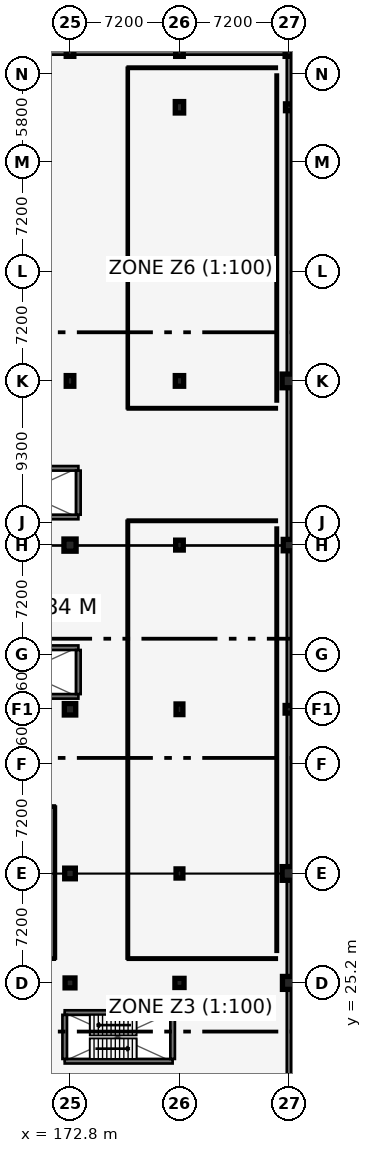
"""IFC4 building model, lengths in metres.
Left out: names, types, materials, properties, quantities, classifications, styles, units other than length and angle.
Written with IfcOpenShell. Run it as: python <this file> out.ifc"""

import sys

from ifc_helpers import new_model, si_unit, direction, frame, frame_2d, origin, origin_2d, place, context, subcontext, project, spatial, rectangle, circle, extrude, element, fill, save


model = new_model("IFC4")
c1 = context("Model", 3, precision=1e-05, world=origin(), true_north=direction((0.0, 1.0)))
c2 = subcontext(c1, "Body", "Model", "MODEL_VIEW")
j1 = project(units=[si_unit("LENGTHUNIT", "METRE"), si_unit("PLANEANGLEUNIT", "RADIAN")], contexts=[c1])
p1 = place(None, origin())
s1 = spatial("IfcSite", under=j1, at=p1, CompositionType="ELEMENT")
p2 = place(p1, origin())
s2 = spatial("IfcBuilding", under=s1, at=p2, CompositionType="ELEMENT")
p3 = place(p2, frame((0.0, 0.0, 9.0)))
s3 = spatial("IfcBuildingStorey", under=s2, at=p3, CompositionType="ELEMENT", Elevation=9.0)
p4 = place(p3, frame((172.8, 25.2, 0.0), z_axis=(0.0, 0.0, 1.0), x_axis=(1.0, 0.0, 0.0)))
e1 = element("IfcColumn", 1, at=p4, inside=s3, PredefinedType="COLUMN", context=c2, shape_type="SweptSolid", body=[
    extrude(rectangle(XDim=0.65, YDim=0.65, at=origin_2d()), origin(), (0.0, 0.0, 1.0), 4.2),
])
p5 = place(p3, frame((172.8, 32.4, 0.0), z_axis=(0.0, 0.0, 1.0), x_axis=(1.0, 0.0, 0.0)))
e2 = element("IfcColumn", 2, at=p5, inside=s3, PredefinedType="COLUMN", context=c2, shape_type="SweptSolid", body=[
    extrude(rectangle(XDim=0.7, YDim=0.7, at=origin_2d()), origin(), (0.0, 0.0, 1.0), 4.2),
])
p6 = place(p3, frame((172.8, 43.2, 0.0), z_axis=(0.0, 0.0, 1.0), x_axis=(1.0, 0.0, 0.0)))
e3 = element("IfcColumn", 3, at=p6, inside=s3, PredefinedType="COLUMN", context=c2, shape_type="SweptSolid", body=[
    extrude(rectangle(XDim=0.75, YDim=0.75, at=origin_2d()), origin(), (0.0, 0.0, 1.0), 4.2),
])
p7 = place(p3, frame((172.8, 54.0, 0.0), z_axis=(0.0, 0.0, 1.0), x_axis=(1.0, 0.0, 0.0)))
e4 = element("IfcColumn", 4, at=p7, inside=s3, PredefinedType="COLUMN", context=c2, shape_type="SweptSolid", body=[
    extrude(rectangle(XDim=0.8, YDim=0.8, at=origin_2d()), origin(), (0.0, 0.0, 1.0), 4.2),
])
p8 = place(p3, frame((172.8, 64.8, 0.0), z_axis=(0.0, 0.0, 1.0), x_axis=(1.0, 0.0, 0.0)))
e5 = element("IfcColumn", 5, at=p8, inside=s3, PredefinedType="COLUMN", context=c2, shape_type="SweptSolid", body=[
    extrude(rectangle(XDim=0.5, YDim=0.7, at=origin_2d()), origin(), (0.0, 0.0, 1.0), 4.2),
])
p9 = place(p3, frame((172.8, 86.4, 0.0), z_axis=(0.0, 0.0, 1.0), x_axis=(1.0, 0.0, 0.0)))
e6 = element("IfcColumn", 6, at=p9, inside=s3, PredefinedType="COLUMN", context=c2, shape_type="SweptSolid", body=[
    extrude(rectangle(XDim=0.5, YDim=0.5, at=origin_2d()), origin(), (0.0, 0.0, 1.0), 4.2),
])
p10 = place(p3, frame((180.0, 25.2, 0.0), z_axis=(0.0, 0.0, 1.0), x_axis=(1.0, 0.0, 0.0)))
e7 = element("IfcColumn", 7, at=p10, inside=s3, PredefinedType="COLUMN", context=c2, shape_type="SweptSolid", body=[
    extrude(circle(Radius=0.3, at=origin_2d()), origin(), (0.0, 0.0, 1.0), 4.2),
])
p11 = place(p3, frame((180.0, 32.4, 0.0), z_axis=(0.0, 0.0, 1.0), x_axis=(1.0, 0.0, 0.0)))
e8 = element("IfcColumn", 8, at=p11, inside=s3, PredefinedType="COLUMN", context=c2, shape_type="SweptSolid", body=[
    extrude(rectangle(XDim=0.45, YDim=0.6, at=origin_2d()), origin(), (0.0, 0.0, 1.0), 4.2),
])
p12 = place(p3, frame((180.0, 43.2, 0.0), z_axis=(0.0, 0.0, 1.0), x_axis=(1.0, 0.0, 0.0)))
e9 = element("IfcColumn", 9, at=p12, inside=s3, PredefinedType="COLUMN", context=c2, shape_type="SweptSolid", body=[
    extrude(rectangle(XDim=0.45, YDim=0.7, at=origin_2d()), origin(), (0.0, 0.0, 1.0), 4.2),
])
p13 = place(p3, frame((180.0, 54.0, 0.0), z_axis=(0.0, 0.0, 1.0), x_axis=(1.0, 0.0, 0.0)))
e10 = element("IfcColumn", 10, at=p13, inside=s3, PredefinedType="COLUMN", context=c2, shape_type="SweptSolid", body=[
    extrude(rectangle(XDim=0.5, YDim=0.65, at=origin_2d()), origin(), (0.0, 0.0, 1.0), 4.2),
])
p14 = place(p3, frame((180.0, 64.8, 0.0), z_axis=(0.0, 0.0, 1.0), x_axis=(1.0, 0.0, 0.0)))
e11 = element("IfcColumn", 11, at=p14, inside=s3, PredefinedType="COLUMN", context=c2, shape_type="SweptSolid", body=[
    extrude(rectangle(XDim=0.55, YDim=0.7, at=origin_2d()), origin(), (0.0, 0.0, 1.0), 4.2),
])
p15 = place(p3, frame((180.0, 82.8, 0.0), z_axis=(0.0, 0.0, 1.0), x_axis=(1.0, 0.0, 0.0)))
e12 = element("IfcColumn", 12, at=p15, inside=s3, PredefinedType="COLUMN", context=c2, shape_type="SweptSolid", body=[
    extrude(rectangle(XDim=0.55, YDim=0.75, at=origin_2d()), origin(), (0.0, 0.0, 1.0), 4.2),
])
p16 = place(p3, frame((180.0, 86.4, 0.0), z_axis=(0.0, 0.0, 1.0), x_axis=(1.0, 0.0, 0.0)))
e13 = element("IfcColumn", 13, at=p16, inside=s3, PredefinedType="COLUMN", context=c2, shape_type="SweptSolid", body=[
    extrude(rectangle(XDim=0.5, YDim=0.5, at=origin_2d()), origin(), (0.0, 0.0, 1.0), 4.2),
])
p17 = place(p3, frame((187.2, 25.2, 0.0), z_axis=(0.0, 0.0, 1.0), x_axis=(1.0, 0.0, 0.0)))
e14 = element("IfcColumn", 14, at=p17, inside=s3, PredefinedType="COLUMN", context=c2, shape_type="SweptSolid", body=[
    extrude(rectangle(XDim=0.85, YDim=0.85, at=origin_2d()), origin(), (0.0, 0.0, 1.0), 4.2),
])
p18 = place(p3, frame((187.2, 32.4, 0.0), z_axis=(0.0, 0.0, 1.0), x_axis=(1.0, 0.0, 0.0)))
e15 = element("IfcColumn", 15, at=p18, inside=s3, PredefinedType="COLUMN", context=c2, shape_type="SweptSolid", body=[
    extrude(rectangle(XDim=0.9, YDim=0.9, at=origin_2d()), origin(), (0.0, 0.0, 1.0), 4.2),
])
p19 = place(p3, frame((187.2, 43.2, 0.0), z_axis=(0.0, 0.0, 1.0), x_axis=(1.0, 0.0, 0.0)))
e16 = element("IfcColumn", 16, at=p19, inside=s3, PredefinedType="COLUMN", context=c2, shape_type="SweptSolid", body=[
    extrude(circle(Radius=0.25, at=origin_2d()), origin(), (0.0, 0.0, 1.0), 4.2),
])
p20 = place(p3, frame((187.2, 54.0, 0.0), z_axis=(0.0, 0.0, 1.0), x_axis=(1.0, 0.0, 0.0)))
e17 = element("IfcColumn", 17, at=p20, inside=s3, PredefinedType="COLUMN", context=c2, shape_type="SweptSolid", body=[
    extrude(circle(Radius=0.375, at=origin_2d()), origin(), (0.0, 0.0, 1.0), 4.2),
])
p21 = place(p3, frame((187.2, 64.8, 0.0), z_axis=(0.0, 0.0, 1.0), x_axis=(1.0, 0.0, 0.0)))
e18 = element("IfcColumn", 18, at=p21, inside=s3, PredefinedType="COLUMN", context=c2, shape_type="SweptSolid", body=[
    extrude(circle(Radius=0.45, at=origin_2d()), origin(), (0.0, 0.0, 1.0), 4.2),
])
p22 = place(p3, frame((187.2, 82.8, 0.0), z_axis=(0.0, 0.0, 1.0), x_axis=(1.0, 0.0, 0.0)))
e19 = element("IfcColumn", 19, at=p22, inside=s3, PredefinedType="COLUMN", context=c2, shape_type="SweptSolid", body=[
    extrude(rectangle(XDim=0.45, YDim=0.45, at=origin_2d()), origin(), (0.0, 0.0, 1.0), 4.2),
])
p23 = place(p3, frame((187.2, 86.4, 0.0), z_axis=(0.0, 0.0, 1.0), x_axis=(1.0, 0.0, 0.0)))
e20 = element("IfcColumn", 20, at=p23, inside=s3, PredefinedType="COLUMN", context=c2, shape_type="SweptSolid", body=[
    extrude(rectangle(XDim=0.5, YDim=0.5, at=origin_2d()), origin(), (0.0, 0.0, 1.0), 4.2),
])
p24 = place(p3, frame((187.2, 0.0, 0.0), z_axis=(0.0, 0.0, 1.0), x_axis=(0.0, 1.0, 0.0)))
e21 = element("IfcWall", 21, at=p24, inside=s3, PredefinedType="SOLIDWALL", context=c2, shape_type="SweptSolid", body=[
    extrude(rectangle(XDim=86.4, YDim=0.28, at=frame_2d((43.2, 0.0))), origin(), (0.0, 0.0, 1.0), 3.4),
])
p25 = place(p24, frame((38.2, 0.0, 0.78)))
e22 = element("IfcOpeningElement", 22, at=p25, cuts=e21, PredefinedType="OPENING", context=c2, shape_type="SweptSolid", body=[
    extrude(rectangle(XDim=1.25, YDim=1.7, at=frame_2d((0.625, 0.85))), frame((0.0, 0.15, 0.0), z_axis=(0.0, -1.0, 0.0), x_axis=(1.0, 0.0, 0.0)), (0.0, 0.0, 1.0), 0.3),
])
p26 = place(p24, frame((45.4, 0.0, 0.78)))
e23 = element("IfcOpeningElement", 23, at=p26, cuts=e21, PredefinedType="OPENING", context=c2, shape_type="SweptSolid", body=[
    extrude(rectangle(XDim=1.35, YDim=1.75, at=frame_2d((0.675, 0.875))), frame((0.0, 0.15, 0.0), z_axis=(0.0, -1.0, 0.0), x_axis=(1.0, 0.0, 0.0)), (0.0, 0.0, 1.0), 0.3),
])
p27 = place(p24, frame((59.8, 0.0, 0.78)))
e24 = element("IfcOpeningElement", 24, at=p27, cuts=e21, PredefinedType="OPENING", context=c2, shape_type="SweptSolid", body=[
    extrude(rectangle(XDim=1.65, YDim=1.8, at=frame_2d((0.825, 0.9))), frame((0.0, 0.15, 0.0), z_axis=(0.0, -1.0, 0.0), x_axis=(1.0, 0.0, 0.0)), (0.0, 0.0, 1.0), 0.3),
])
p28 = place(p24, frame((67.0, 0.0, 0.78)))
e25 = element("IfcOpeningElement", 25, at=p28, cuts=e21, PredefinedType="OPENING", context=c2, shape_type="SweptSolid", body=[
    extrude(rectangle(XDim=1.95, YDim=1.8, at=frame_2d((0.975, 0.9))), frame((0.0, 0.15, 0.0), z_axis=(0.0, -1.0, 0.0), x_axis=(1.0, 0.0, 0.0)), (0.0, 0.0, 1.0), 0.3),
])
p29 = place(p24, frame((74.2, 0.0, 0.78)))
e26 = element("IfcOpeningElement", 26, at=p29, cuts=e21, PredefinedType="OPENING", context=c2, shape_type="SweptSolid", body=[
    extrude(rectangle(XDim=2.1, YDim=1.8, at=frame_2d((1.05, 0.9))), frame((0.0, 0.15, 0.0), z_axis=(0.0, -1.0, 0.0), x_axis=(1.0, 0.0, 0.0)), (0.0, 0.0, 1.0), 0.3),
])
p30 = place(p3, frame((187.2, 86.4, 0.0), z_axis=(0.0, 0.0, 1.0), x_axis=(-1.0, 0.0, 0.0)))
e27 = element("IfcWall", 27, at=p30, inside=s3, PredefinedType="SOLIDWALL", context=c2, shape_type="SweptSolid", body=[
    extrude(rectangle(XDim=21.6, YDim=0.28, at=frame_2d((10.8, 0.0))), origin(), (0.0, 0.0, 1.0), 3.4),
])
p31 = place(p30, frame((2.2, 0.0, 0.78)))
e28 = element("IfcOpeningElement", 28, at=p31, cuts=e27, PredefinedType="OPENING", context=c2, shape_type="SweptSolid", body=[
    extrude(rectangle(XDim=1.65, YDim=1.8, at=frame_2d((0.825, 0.9))), frame((0.0, 0.15, 0.0), z_axis=(0.0, -1.0, 0.0), x_axis=(1.0, 0.0, 0.0)), (0.0, 0.0, 1.0), 0.3),
])
p32 = place(p30, frame((9.4, 0.0, 0.78)))
e29 = element("IfcOpeningElement", 29, at=p32, cuts=e27, PredefinedType="OPENING", context=c2, shape_type="SweptSolid", body=[
    extrude(rectangle(XDim=1.95, YDim=1.8, at=frame_2d((0.975, 0.9))), frame((0.0, 0.15, 0.0), z_axis=(0.0, -1.0, 0.0), x_axis=(1.0, 0.0, 0.0)), (0.0, 0.0, 1.0), 0.3),
])
p33 = place(p3, frame((172.45, 20.05, 0.0), z_axis=(0.0, 0.0, 1.0), x_axis=(1.0, 0.0, 0.0)))
e30 = element("IfcWall", 30, at=p33, inside=s3, PredefinedType="SHEAR", context=c2, shape_type="SweptSolid", body=[
    extrude(rectangle(XDim=7.1, YDim=0.3, at=frame_2d((3.55, 0.0))), origin(), (0.0, 0.0, 1.0), 3.875),
])
p34 = place(p33, frame((0.35, 0.0, 0.0)))
e31 = element("IfcOpeningElement", 31, at=p34, cuts=e30, PredefinedType="OPENING", context=c2, shape_type="SweptSolid", body=[
    extrude(rectangle(XDim=1.05, YDim=2.15, at=frame_2d((0.525, 1.075))), frame((0.0, 0.16, 0.0), z_axis=(0.0, -1.0, 0.0), x_axis=(1.0, 0.0, 0.0)), (0.0, 0.0, 1.0), 0.32),
])
p35 = place(p3, frame((179.55, 23.25, 0.0), z_axis=(0.0, 0.0, 1.0), x_axis=(-1.0, 0.0, 0.0)))
e32 = element("IfcWall", 32, at=p35, inside=s3, PredefinedType="SHEAR", context=c2, shape_type="SweptSolid", body=[
    extrude(rectangle(XDim=7.1, YDim=0.3, at=frame_2d((3.55, 0.0))), origin(), (0.0, 0.0, 1.0), 3.875),
])
for number, where, z_axis, x_axis in (
    (33, (179.55, 20.2, 0.0), (0.0, 0.0, 1.0), (0.0, 1.0, 0.0)),
    (34, (172.45, 23.1, 0.0), (0.0, 0.0, 1.0), (0.0, -1.0, 0.0)),
):
    element("IfcWall", number, at=place(p3, frame(where, z_axis=z_axis, x_axis=x_axis)), inside=s3, PredefinedType="SHEAR", context=c2, shape_type="SweptSolid", body=[
        extrude(rectangle(XDim=2.9, YDim=0.3, at=frame_2d((1.45, 0.0))), origin(), (0.0, 0.0, 1.0), 3.875),
    ])
for number, where, z_axis, x_axis in (
    (35, (166.25, 44.05, 0.0), (0.0, 0.0, 1.0), (1.0, 0.0, 0.0)),
    (36, (173.35, 47.25, 0.0), (0.0, 0.0, 1.0), (-1.0, 0.0, 0.0)),
):
    element("IfcWall", number, at=place(p3, frame(where, z_axis=z_axis, x_axis=x_axis)), inside=s3, PredefinedType="SHEAR", context=c2, shape_type="SweptSolid", body=[
        extrude(rectangle(XDim=7.1, YDim=0.3, at=frame_2d((3.55, 0.0))), origin(), (0.0, 0.0, 1.0), 3.925),
    ])
p36 = place(p3, frame((173.35, 44.2, 0.0), z_axis=(0.0, 0.0, 1.0), x_axis=(0.0, 1.0, 0.0)))
e37 = element("IfcWall", 37, at=p36, inside=s3, PredefinedType="SHEAR", context=c2, shape_type="SweptSolid", body=[
    extrude(rectangle(XDim=2.9, YDim=0.3, at=frame_2d((1.45, 0.0))), origin(), (0.0, 0.0, 1.0), 3.925),
])
for number, where, z_axis, x_axis in (
    (38, (166.25, 55.85, 0.0), (0.0, 0.0, 1.0), (1.0, 0.0, 0.0)),
    (39, (173.35, 59.05, 0.0), (0.0, 0.0, 1.0), (-1.0, 0.0, 0.0)),
):
    element("IfcWall", number, at=place(p3, frame(where, z_axis=z_axis, x_axis=x_axis)), inside=s3, PredefinedType="SHEAR", context=c2, shape_type="SweptSolid", body=[
        extrude(rectangle(XDim=7.1, YDim=0.3, at=frame_2d((3.55, 0.0))), origin(), (0.0, 0.0, 1.0), 3.925),
    ])
p37 = place(p3, frame((173.35, 56.0, 0.0), z_axis=(0.0, 0.0, 1.0), x_axis=(0.0, 1.0, 0.0)))
e40 = element("IfcWall", 40, at=p37, inside=s3, PredefinedType="SHEAR", context=c2, shape_type="SweptSolid", body=[
    extrude(rectangle(XDim=2.9, YDim=0.3, at=frame_2d((1.45, 0.0))), origin(), (0.0, 0.0, 1.0), 3.925),
])
p38 = place(p3, frame((176.6, 55.6, 0.0), z_axis=(0.0, 0.0, 1.0), x_axis=(1.0, 0.0, 0.0)))
e41 = element("IfcWall", 41, at=p38, inside=s3, PredefinedType="PARTITIONING", context=c2, shape_type="SweptSolid", body=[
    extrude(rectangle(XDim=9.8, YDim=0.15, at=frame_2d((4.9, 0.0))), origin(), (0.0, 0.0, 1.0), 3.307),
])
p39 = place(p3, frame((186.4, 26.8, 0.0), z_axis=(0.0, 0.0, 1.0), x_axis=(-1.0, 0.0, 0.0)))
e42 = element("IfcWall", 42, at=p39, inside=s3, PredefinedType="PARTITIONING", context=c2, shape_type="SweptSolid", body=[
    extrude(rectangle(XDim=9.8, YDim=0.15, at=frame_2d((4.9, 0.0))), origin(), (0.0, 0.0, 1.0), 3.502),
])
p40 = place(p3, frame((186.4, 27.25, 0.0), z_axis=(0.0, 0.0, 1.0), x_axis=(0.0, 1.0, 0.0)))
e43 = element("IfcWall", 43, at=p40, inside=s3, PredefinedType="PARTITIONING", context=c2, shape_type="SweptSolid", body=[
    extrude(rectangle(XDim=27.9, YDim=0.15, at=frame_2d((13.95, 0.0))), origin(), (0.0, 0.0, 1.0), 2.957),
])
p41 = place(p3, frame((176.6, 55.6, 0.0), z_axis=(0.0, 0.0, 1.0), x_axis=(0.0, -1.0, 0.0)))
e44 = element("IfcWall", 44, at=p41, inside=s3, PredefinedType="PARTITIONING", context=c2, shape_type="SweptSolid", body=[
    extrude(rectangle(XDim=28.8, YDim=0.15, at=frame_2d((14.4, 0.0))), origin(), (0.0, 0.0, 1.0), 3.007),
])
p42 = place(p41, frame((13.92, 0.0, 0.0)))
e45 = element("IfcOpeningElement", 45, at=p42, cuts=e44, PredefinedType="OPENING", context=c2, shape_type="SweptSolid", body=[
    extrude(rectangle(XDim=0.96, YDim=2.15, at=frame_2d((0.48, 1.075))), frame((0.0, 0.085, 0.0), z_axis=(0.0, -1.0, 0.0), x_axis=(1.0, 0.0, 0.0)), (0.0, 0.0, 1.0), 0.17),
])
p43 = place(p3, frame((176.6, 85.4, 0.0), z_axis=(0.0, 0.0, 1.0), x_axis=(1.0, 0.0, 0.0)))
e46 = element("IfcWall", 46, at=p43, inside=s3, PredefinedType="PARTITIONING", context=c2, shape_type="SweptSolid", body=[
    extrude(rectangle(XDim=9.8, YDim=0.15, at=frame_2d((4.9, 0.0))), origin(), (0.0, 0.0, 1.0), 3.6),
])
p44 = place(p3, frame((186.4, 63.0, 0.0), z_axis=(0.0, 0.0, 1.0), x_axis=(-1.0, 0.0, 0.0)))
e47 = element("IfcWall", 47, at=p44, inside=s3, PredefinedType="PARTITIONING", context=c2, shape_type="SweptSolid", body=[
    extrude(rectangle(XDim=9.8, YDim=0.15, at=frame_2d((4.9, 0.0))), origin(), (0.0, 0.0, 1.0), 3.307),
])
p45 = place(p3, frame((186.4, 63.45, 0.0), z_axis=(0.0, 0.0, 1.0), x_axis=(0.0, 1.0, 0.0)))
e48 = element("IfcWall", 48, at=p45, inside=s3, PredefinedType="PARTITIONING", context=c2, shape_type="SweptSolid", body=[
    extrude(rectangle(XDim=21.5, YDim=0.15, at=frame_2d((10.75, 0.0))), origin(), (0.0, 0.0, 1.0), 3.174),
])
p46 = place(p3, frame((176.6, 85.4, 0.0), z_axis=(0.0, 0.0, 1.0), x_axis=(0.0, -1.0, 0.0)))
e49 = element("IfcWall", 49, at=p46, inside=s3, PredefinedType="PARTITIONING", context=c2, shape_type="SweptSolid", body=[
    extrude(rectangle(XDim=22.4, YDim=0.125, at=frame_2d((11.2, 0.0))), origin(), (0.0, 0.0, 1.0), 3.174),
])
p47 = place(p46, frame((10.715, 0.0, 0.0)))
e50 = element("IfcOpeningElement", 50, at=p47, cuts=e49, PredefinedType="OPENING", context=c2, shape_type="SweptSolid", body=[
    extrude(rectangle(XDim=0.97, YDim=2.15, at=frame_2d((0.485, 1.075))), frame((0.0, 0.073, 0.0), z_axis=(0.0, -1.0, 0.0), x_axis=(1.0, 0.0, 0.0)), (0.0, 0.0, 1.0), 0.145),
])
for number, where, z_axis, x_axis in (
    (51, (166.2, 36.8, 0.0), (0.0, 0.0, 1.0), (1.0, 0.0, 0.0)),
    (52, (171.8, 26.8, 0.0), (0.0, 0.0, 1.0), (-1.0, 0.0, 0.0)),
):
    element("IfcWall", number, at=place(p3, frame(where, z_axis=z_axis, x_axis=x_axis)), inside=s3, PredefinedType="PARTITIONING", context=c2, shape_type="SweptSolid", body=[
        extrude(rectangle(XDim=5.6, YDim=0.14, at=frame_2d((2.8, 0.0))), origin(), (0.0, 0.0, 1.0), 3.5),
    ])
p48 = place(p3, frame((171.8, 26.8, 0.0), z_axis=(0.0, 0.0, 1.0), x_axis=(0.0, 1.0, 0.0)))
e53 = element("IfcWall", 53, at=p48, inside=s3, PredefinedType="PARTITIONING", context=c2, shape_type="SweptSolid", body=[
    extrude(rectangle(XDim=10.0, YDim=0.14, at=frame_2d((5.0, 0.0))), origin(), (0.0, 0.0, 1.0), 3.5),
])
p49 = place(p48, frame((2.706, 0.0, 0.0)))
e54 = element("IfcOpeningElement", 54, at=p49, cuts=e53, PredefinedType="OPENING", context=c2, shape_type="SweptSolid", body=[
    extrude(rectangle(XDim=0.98, YDim=2.15, at=frame_2d((0.49, 1.075))), frame((0.0, 0.08, 0.0), z_axis=(0.0, -1.0, 0.0), x_axis=(1.0, 0.0, 0.0)), (0.0, 0.0, 1.0), 0.16),
])
p50 = place(p25, origin())
e55 = element("IfcWindow", 55, at=p50, inside=s3, PartitioningType="SINGLE_PANEL", PredefinedType="WINDOW", context=c2, shape_type="SweptSolid", body=[
    extrude(rectangle(XDim=1.25, YDim=1.7, at=frame_2d((0.625, 0.85))), frame((0.0, 0.03, 0.0), z_axis=(0.0, -1.0, 0.0), x_axis=(1.0, 0.0, 0.0)), (0.0, 0.0, 1.0), 0.06),
])
fill(e22, e55)
p51 = place(p26, origin())
e56 = element("IfcWindow", 56, at=p51, inside=s3, PartitioningType="SINGLE_PANEL", PredefinedType="WINDOW", context=c2, shape_type="SweptSolid", body=[
    extrude(rectangle(XDim=1.35, YDim=1.75, at=frame_2d((0.675, 0.875))), frame((0.0, 0.03, 0.0), z_axis=(0.0, -1.0, 0.0), x_axis=(1.0, 0.0, 0.0)), (0.0, 0.0, 1.0), 0.06),
])
fill(e23, e56)
p52 = place(p27, origin())
e57 = element("IfcWindow", 57, at=p52, inside=s3, PartitioningType="SINGLE_PANEL", PredefinedType="WINDOW", context=c2, shape_type="SweptSolid", body=[
    extrude(rectangle(XDim=1.65, YDim=1.8, at=frame_2d((0.825, 0.9))), frame((0.0, 0.03, 0.0), z_axis=(0.0, -1.0, 0.0), x_axis=(1.0, 0.0, 0.0)), (0.0, 0.0, 1.0), 0.06),
])
fill(e24, e57)
p53 = place(p28, origin())
e58 = element("IfcWindow", 58, at=p53, inside=s3, PartitioningType="SINGLE_PANEL", PredefinedType="WINDOW", context=c2, shape_type="SweptSolid", body=[
    extrude(rectangle(XDim=1.95, YDim=1.8, at=frame_2d((0.975, 0.9))), frame((0.0, 0.03, 0.0), z_axis=(0.0, -1.0, 0.0), x_axis=(1.0, 0.0, 0.0)), (0.0, 0.0, 1.0), 0.06),
])
fill(e25, e58)
p54 = place(p29, origin())
e59 = element("IfcWindow", 59, at=p54, inside=s3, PartitioningType="SINGLE_PANEL", PredefinedType="WINDOW", context=c2, shape_type="SweptSolid", body=[
    extrude(rectangle(XDim=2.1, YDim=1.8, at=frame_2d((1.05, 0.9))), frame((0.0, 0.03, 0.0), z_axis=(0.0, -1.0, 0.0), x_axis=(1.0, 0.0, 0.0)), (0.0, 0.0, 1.0), 0.06),
])
fill(e26, e59)
p55 = place(p31, origin())
e60 = element("IfcWindow", 60, at=p55, inside=s3, PartitioningType="SINGLE_PANEL", PredefinedType="WINDOW", context=c2, shape_type="SweptSolid", body=[
    extrude(rectangle(XDim=1.65, YDim=1.8, at=frame_2d((0.825, 0.9))), frame((0.0, 0.03, 0.0), z_axis=(0.0, -1.0, 0.0), x_axis=(1.0, 0.0, 0.0)), (0.0, 0.0, 1.0), 0.06),
])
fill(e28, e60)
p56 = place(p32, origin())
e61 = element("IfcWindow", 61, at=p56, inside=s3, PartitioningType="SINGLE_PANEL", PredefinedType="WINDOW", context=c2, shape_type="SweptSolid", body=[
    extrude(rectangle(XDim=1.95, YDim=1.8, at=frame_2d((0.975, 0.9))), frame((0.0, 0.03, 0.0), z_axis=(0.0, -1.0, 0.0), x_axis=(1.0, 0.0, 0.0)), (0.0, 0.0, 1.0), 0.06),
])
fill(e29, e61)
p57 = place(p34, origin())
e62 = element("IfcDoor", 62, at=p57, inside=s3, OperationType="SINGLE_SWING_LEFT", PredefinedType="DOOR", context=c2, shape_type="SweptSolid", body=[
    extrude(rectangle(XDim=1.05, YDim=2.15, at=frame_2d((0.525, 1.075))), frame((0.0, 0.025, 0.0), z_axis=(0.0, -1.0, 0.0), x_axis=(1.0, 0.0, 0.0)), (0.0, 0.0, 1.0), 0.05),
])
fill(e31, e62)
p58 = place(p42, origin())
e63 = element("IfcDoor", 63, at=p58, inside=s3, OperationType="SINGLE_SWING_LEFT", PredefinedType="DOOR", context=c2, shape_type="SweptSolid", body=[
    extrude(rectangle(XDim=0.96, YDim=2.15, at=frame_2d((0.48, 1.075))), frame((0.0, 0.025, 0.0), z_axis=(0.0, -1.0, 0.0), x_axis=(1.0, 0.0, 0.0)), (0.0, 0.0, 1.0), 0.05),
])
fill(e45, e63)
p59 = place(p47, origin())
e64 = element("IfcDoor", 64, at=p59, inside=s3, OperationType="SINGLE_SWING_RIGHT", PredefinedType="DOOR", context=c2, shape_type="SweptSolid", body=[
    extrude(rectangle(XDim=0.97, YDim=2.15, at=frame_2d((0.485, 1.075))), frame((0.0, 0.025, 0.0), z_axis=(0.0, -1.0, 0.0), x_axis=(1.0, 0.0, 0.0)), (0.0, 0.0, 1.0), 0.05),
])
fill(e50, e64)
p60 = place(p49, origin())
e65 = element("IfcDoor", 65, at=p60, inside=s3, OperationType="SINGLE_SWING_LEFT", PredefinedType="DOOR", context=c2, shape_type="SweptSolid", body=[
    extrude(rectangle(XDim=0.98, YDim=2.15, at=frame_2d((0.49, 1.075))), frame((0.0, 0.025, 0.0), z_axis=(0.0, -1.0, 0.0), x_axis=(1.0, 0.0, 0.0)), (0.0, 0.0, 1.0), 0.05),
])
fill(e54, e65)
save(model, sys.argv[1])
